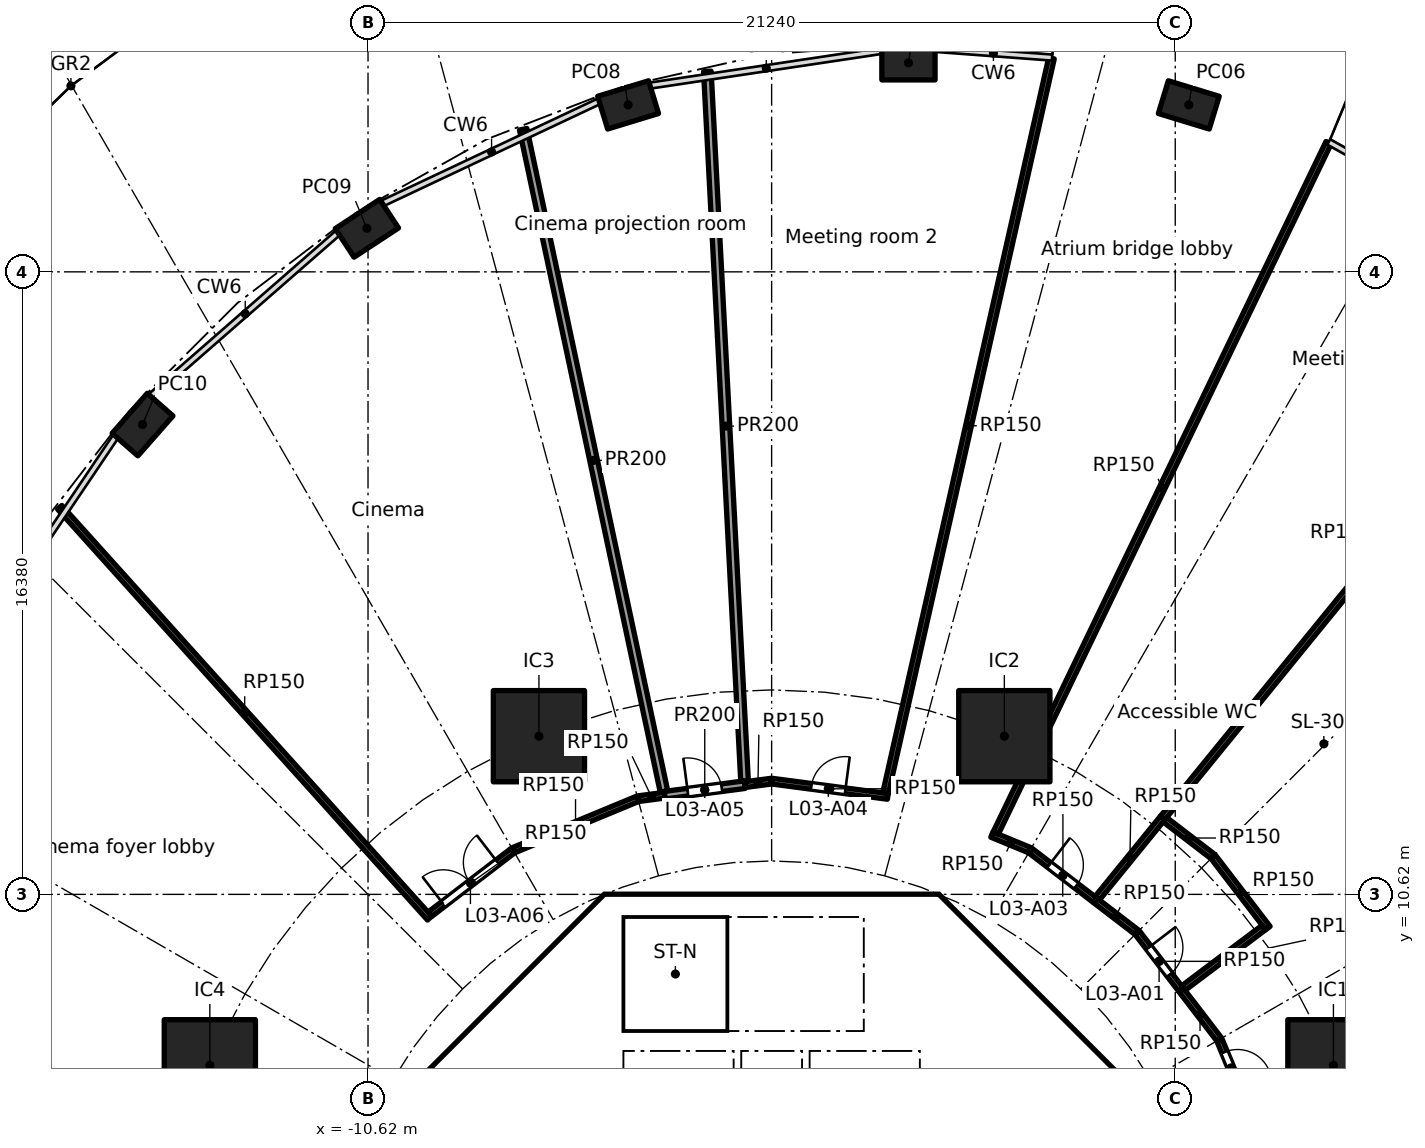
"""IFC4 building model, lengths in metres.
Left out: names, types, materials, properties, quantities, classifications, styles, units other than length and angle.
Written with IfcOpenShell. Run it as: python <this file> out.ifc"""

import sys

from ifc_helpers import new_model, si_unit, direction, frame, frame_2d, origin, origin_2d, place, context, subcontext, project, spatial, polyline, rectangle, hollow_rectangle, outline, extrude, element, fill, save


model = new_model("IFC4")
c1 = context("Model", 3, precision=1e-05, world=origin(), true_north=direction((0.0, 1.0)))
c2 = subcontext(c1, "Body", "Model", "MODEL_VIEW")
j1 = project(units=[si_unit("LENGTHUNIT", "METRE"), si_unit("PLANEANGLEUNIT", "RADIAN")], contexts=[c1])
p1 = place(None, origin())
s1 = spatial("IfcSite", under=j1, at=p1, CompositionType="ELEMENT")
p2 = place(p1, origin())
s2 = spatial("IfcBuilding", under=s1, at=p2, CompositionType="ELEMENT")
p3 = place(p2, frame((0.0, 0.0, 17.0)))
s3 = spatial("IfcBuildingStorey", under=s2, at=p3, CompositionType="ELEMENT", Elevation=17.0)
for number, where, z_axis, x_axis in (
    (1, (10.976, 31.393, 0.0), (0.0, 0.0, 1.0), (-0.957, 0.292, 0.0)),
    (2, (3.6, 32.5, 0.0), (0.0, 0.0, 1.0), (-1.0, 0.0, 0.0)),
    (3, (-3.776, 31.393, 0.0), (0.0, 0.0, 1.0), (-0.957, -0.292, 0.0)),
    (4, (-10.65, 28.146, 0.0), (0.0, 0.0, 1.0), (-0.836, -0.549, 0.0)),
    (5, (-16.552, 22.981, 0.0), (0.0, 0.0, 1.0), (-0.66, -0.751, 0.0)),
):
    element("IfcColumn", number, at=place(p3, frame(where, z_axis=z_axis, x_axis=x_axis)), inside=s3, PredefinedType="COLUMN", context=c2, shape_type="SweptSolid", body=[
        extrude(hollow_rectangle(XDim=1.4, YDim=0.9, WallThickness=0.05, at=origin_2d()), origin(), (0.0, 0.0, 1.0), 5.0),
    ])
for number, where, z_axis, x_axis in (
    (6, (14.782, 6.123, 0.0), (0.0, 0.0, 1.0), (1.0, 0.0, 0.0)),
    (7, (6.123, 14.782, 0.0), (0.0, 0.0, 1.0), (1.0, 0.0, 0.0)),
    (8, (-6.123, 14.782, 0.0), (0.0, 0.0, 1.0), (1.0, 0.0, 0.0)),
    (9, (-14.782, 6.123, 0.0), (0.0, 0.0, 1.0), (1.0, 0.0, 0.0)),
):
    element("IfcColumn", number, at=place(p3, frame(where, z_axis=z_axis, x_axis=x_axis)), inside=s3, PredefinedType="COLUMN", context=c2, shape_type="SweptSolid", body=[
        extrude(rectangle(XDim=2.4, YDim=2.4, at=origin_2d()), origin(), (0.0, 0.0, 1.0), 5.0),
    ])
p4 = place(p3, frame((9.988, 4.613, 0.0), z_axis=(0.0, 0.0, 1.0), x_axis=(-0.707106781187, 0.707106781187, 0.0)))
e10 = element("IfcWall", 10, at=p4, inside=s3, PredefinedType="SHEAR", context=c2, shape_type="SweptSolid", body=[
    extrude(rectangle(XDim=7.602, YDim=0.6, at=frame_2d((3.801, 0.0))), origin(), (0.0, 0.0, 1.0), 4.7),
])
p5 = place(p4, frame((3.201, 0.0, 0.0)))
e11 = element("IfcOpeningElement", 11, at=p5, cuts=e10, PredefinedType="OPENING", context=c2, shape_type="SweptSolid", body=[
    extrude(rectangle(XDim=1.2, YDim=2.1, at=frame_2d((0.6, 1.05))), frame((0.0, 0.31, 0.0), z_axis=(0.0, -1.0, 0.0), x_axis=(1.0, 0.0, 0.0)), (0.0, 0.0, 1.0), 0.62),
])
p6 = place(p3, frame((-4.613, 9.988, 0.0), z_axis=(0.0, 0.0, 1.0), x_axis=(-0.707106781187, -0.707106781187, 0.0)))
e12 = element("IfcWall", 12, at=p6, inside=s3, PredefinedType="SHEAR", context=c2, shape_type="SweptSolid", body=[
    extrude(rectangle(XDim=7.602, YDim=0.6, at=frame_2d((3.801, 0.0))), origin(), (0.0, 0.0, 1.0), 4.7),
])
p7 = place(p6, frame((0.351, 0.0, 0.0)))
e13 = element("IfcOpeningElement", 13, at=p7, cuts=e12, PredefinedType="OPENING", context=c2, shape_type="SweptSolid", body=[
    extrude(rectangle(XDim=1.1, YDim=2.1, at=frame_2d((0.55, 1.05))), frame((0.0, 0.31, 0.0), z_axis=(0.0, -1.0, 0.0), x_axis=(1.0, 0.0, 0.0)), (0.0, 0.0, 1.0), 0.62),
])
p8 = place(p3, frame((-5.8, 4.3, 0.0), z_axis=(0.0, 0.0, 1.0), x_axis=(0.0, 1.0, 0.0)))
e14 = element("IfcWall", 14, at=p8, inside=s3, PredefinedType="PARTITIONING", context=c2, shape_type="SweptSolid", body=[
    extrude(rectangle(XDim=3.927, YDim=0.15, at=frame_2d((1.963, 0.0))), origin(), (0.0, 0.0, 1.0), 4.7),
])
p9 = place(p8, frame((1.551, 0.0, 0.0)))
e15 = element("IfcOpeningElement", 15, at=p9, cuts=e14, PredefinedType="OPENING", context=c2, shape_type="SweptSolid", body=[
    extrude(rectangle(XDim=0.9, YDim=2.1, at=frame_2d((0.45, 1.05))), frame((0.0, 0.085, 0.0), z_axis=(0.0, -1.0, 0.0), x_axis=(1.0, 0.0, 0.0)), (0.0, 0.0, 1.0), 0.17),
])
p10 = place(p3, frame((4.0, 4.3, 0.0), z_axis=(0.0, 0.0, 1.0), x_axis=(0.0, 1.0, 0.0)))
e16 = element("IfcWall", 16, at=p10, inside=s3, PredefinedType="SOLIDWALL", context=c2, shape_type="SweptSolid", body=[
    extrude(rectangle(XDim=2.2, YDim=0.2, at=frame_2d((1.1, 0.0))), origin(), (0.0, 0.0, 1.0), 4.7),
])
p11 = place(p10, frame((0.55, 0.0, 0.0)))
e17 = element("IfcOpeningElement", 17, at=p11, cuts=e16, PredefinedType="OPENING", context=c2, shape_type="SweptSolid", body=[
    extrude(rectangle(XDim=1.1, YDim=2.1, at=frame_2d((0.55, 1.05))), frame((0.0, 0.11, 0.0), z_axis=(0.0, -1.0, 0.0), x_axis=(1.0, 0.0, 0.0)), (0.0, 0.0, 1.0), 0.22),
])
p12 = place(p3, frame((-4.0, 4.3, 0.0), z_axis=(0.0, 0.0, 1.0), x_axis=(0.0, 1.0, 0.0)))
e18 = element("IfcWall", 18, at=p12, inside=s3, PredefinedType="SOLIDWALL", context=c2, shape_type="SweptSolid", body=[
    extrude(rectangle(XDim=2.2, YDim=0.2, at=frame_2d((1.1, 0.0))), origin(), (0.0, 0.0, 1.0), 4.7),
])
p13 = place(p12, frame((0.55, 0.0, 0.0)))
e19 = element("IfcOpeningElement", 19, at=p13, cuts=e18, PredefinedType="OPENING", context=c2, shape_type="SweptSolid", body=[
    extrude(rectangle(XDim=1.1, YDim=2.1, at=frame_2d((0.55, 1.05))), frame((0.0, 0.11, 0.0), z_axis=(0.0, -1.0, 0.0), x_axis=(1.0, 0.0, 0.0)), (0.0, 0.0, 1.0), 0.22),
])
p14 = place(p3, frame((4.0, 7.025, 0.0), z_axis=(0.0, 0.0, 1.0), x_axis=(0.0, 1.0, 0.0)))
e20 = element("IfcWall", 20, at=p14, inside=s3, PredefinedType="SOLIDWALL", context=c2, shape_type="SweptSolid", body=[
    extrude(rectangle(XDim=3.0, YDim=0.2, at=frame_2d((1.5, 0.0))), origin(), (0.0, 0.0, 1.0), 4.7),
])
p15 = place(p14, frame((0.925, 0.0, 0.0)))
e21 = element("IfcOpeningElement", 21, at=p15, cuts=e20, PredefinedType="OPENING", context=c2, shape_type="SweptSolid", body=[
    extrude(rectangle(XDim=1.1, YDim=2.1, at=frame_2d((0.55, 1.05))), frame((0.0, 0.11, 0.0), z_axis=(0.0, -1.0, 0.0), x_axis=(1.0, 0.0, 0.0)), (0.0, 0.0, 1.0), 0.22),
])
p16 = place(p3, origin())
e22 = element("IfcWall", 22, at=p16, inside=s3, PredefinedType="SHEAR", context=c2, shape_type="SweptSolid", body=[
    extrude(outline(polyline([(-4.152, 10.025), (-4.401, 9.776), (-4.825, 10.2), (-4.401, 10.625), (4.401, 10.625), (4.825, 10.2), (4.401, 9.776), (4.152, 10.025), (-4.152, 10.025)])), origin(), (0.0, 0.0, 1.0), 4.7),
])
for number, where, z_axis, x_axis in (
    (23, (-0.9, 4.3, 0.0), (0.0, 0.0, 1.0), (0.0, 1.0, 0.0)),
    (24, (0.9, 4.3, 0.0), (0.0, 0.0, 1.0), (0.0, 1.0, 0.0)),
):
    element("IfcWall", number, at=place(p3, frame(where, z_axis=z_axis, x_axis=x_axis)), inside=s3, PredefinedType="SOLIDWALL", context=c2, shape_type="SweptSolid", body=[
        extrude(rectangle(XDim=2.2, YDim=0.2, at=frame_2d((1.1, 0.0))), origin(), (0.0, 0.0, 1.0), 4.7),
    ])
p17 = place(p3, origin())
e25 = element("IfcWall", 25, at=p17, inside=s3, PredefinedType="SOLIDWALL", context=c2, shape_type="SweptSolid", body=[
    extrude(outline(polyline([(-3.9, 7.025), (-4.1, 7.025), (-4.1, 10.025), (-3.9, 10.025), (-3.9, 7.025)])), origin(), (0.0, 0.0, 1.0), 4.7),
])
p18 = place(p3, origin())
e26 = element("IfcWall", 26, at=p18, inside=s3, PredefinedType="SOLIDWALL", context=c2, shape_type="SweptSolid", body=[
    extrude(outline(polyline([(4.1, 6.5), (-4.1, 6.5), (-4.1, 7.025), (4.1, 7.025), (4.1, 6.5)])), origin(), (0.0, 0.0, 1.0), 4.7),
])
p19 = place(p3, frame((-18.731, 20.803, 0.0), z_axis=(0.0, 0.0, 1.0), x_axis=(0.669128883479, -0.743146376762, 0.0)))
e27 = element("IfcWall", 27, at=p19, inside=s3, PredefinedType="PARTITIONING", context=c2, shape_type="SweptSolid", body=[
    extrude(rectangle(XDim=14.543, YDim=0.15, at=frame_2d((7.271, 0.0))), origin(), (0.0, 0.0, 1.0), 4.7),
])
p20 = place(p3, frame((-8.991, 10.097, 0.0), z_axis=(0.0, 0.0, 1.0), x_axis=(0.793399081384, 0.608701813418, 0.0)))
e28 = element("IfcWall", 28, at=p20, inside=s3, PredefinedType="PARTITIONING", context=c2, shape_type="SweptSolid", body=[
    extrude(rectangle(XDim=2.75, YDim=0.15, at=frame_2d((1.375, 0.0))), origin(), (0.0, 0.0, 1.0), 4.7),
])
p21 = place(p20, frame((0.443, 0.0, 0.0)))
e29 = element("IfcOpeningElement", 29, at=p21, cuts=e28, PredefinedType="OPENING", context=c2, shape_type="SweptSolid", body=[
    extrude(rectangle(XDim=1.8, YDim=2.1, at=frame_2d((0.9, 1.05))), frame((0.0, 0.085, 0.0), z_axis=(0.0, -1.0, 0.0), x_axis=(1.0, 0.0, 0.0)), (0.0, 0.0, 1.0), 0.17),
])
p22 = place(p3, frame((-6.789, 11.782, 0.0), z_axis=(0.0, 0.0, 1.0), x_axis=(0.923881838111, 0.382677866108, 0.0)))
e30 = element("IfcWall", 30, at=p22, inside=s3, PredefinedType="PARTITIONING", context=c2, shape_type="SweptSolid", body=[
    extrude(rectangle(XDim=3.527, YDim=0.15, at=frame_2d((1.763, 0.0))), origin(), (0.0, 0.0, 1.0), 4.7),
])
p23 = place(p3, frame((-3.508, 13.138, 0.0), z_axis=(0.0, 0.0, 1.0), x_axis=(0.991460212813, 0.130409533429, 0.0)))
e31 = element("IfcWall", 31, at=p23, inside=s3, PredefinedType="PARTITIONING", context=c2, shape_type="SweptSolid", body=[
    extrude(rectangle(XDim=0.702, YDim=0.15, at=frame_2d((0.351, 0.0))), origin(), (0.0, 0.0, 1.0), 4.7),
])
p24 = place(p3, frame((-0.708, 13.507, 0.0), z_axis=(0.0, 0.0, 1.0), x_axis=(0.991466123966, 0.130364585024, 0.0)))
e32 = element("IfcWall", 32, at=p24, inside=s3, PredefinedType="PARTITIONING", context=c2, shape_type="SweptSolid", body=[
    extrude(rectangle(XDim=0.702, YDim=0.15, at=frame_2d((0.351, 0.0))), origin(), (0.0, 0.0, 1.0), 4.7),
])
p25 = place(p3, frame((0.012, 13.598, 0.0), z_axis=(0.0, 0.0, 1.0), x_axis=(0.991450776896, -0.130481251495, 0.0)))
e33 = element("IfcWall", 33, at=p25, inside=s3, PredefinedType="PARTITIONING", context=c2, shape_type="SweptSolid", body=[
    extrude(rectangle(XDim=3.071, YDim=0.15, at=frame_2d((1.535, 0.0))), origin(), (0.0, 0.0, 1.0), 4.7),
])
p26 = place(p25, frame((1.042, 0.0, 0.0)))
e34 = element("IfcOpeningElement", 34, at=p26, cuts=e33, PredefinedType="OPENING", context=c2, shape_type="SweptSolid", body=[
    extrude(rectangle(XDim=0.9, YDim=2.1, at=frame_2d((0.45, 1.05))), frame((0.0, 0.085, 0.0), z_axis=(0.0, -1.0, 0.0), x_axis=(1.0, 0.0, 0.0)), (0.0, 0.0, 1.0), 0.17),
])
p27 = place(p3, frame((2.998, 13.281, 0.0), z_axis=(0.0, 0.0, 1.0), x_axis=(0.220191699756, 0.975456618901, 0.0)))
e35 = element("IfcWall", 35, at=p27, inside=s3, PredefinedType="PARTITIONING", context=c2, shape_type="SweptSolid", body=[
    extrude(rectangle(XDim=19.825, YDim=0.15, at=frame_2d((9.912, 0.0))), origin(), (0.0, 0.0, 1.0), 4.7),
])
p28 = place(p3, frame((5.795, 12.194, 0.0), z_axis=(0.0, 0.0, 1.0), x_axis=(0.923867429555, -0.382712650179, 0.0)))
e36 = element("IfcWall", 36, at=p28, inside=s3, PredefinedType="PARTITIONING", context=c2, shape_type="SweptSolid", body=[
    extrude(rectangle(XDim=1.075, YDim=0.15, at=frame_2d((0.538, 0.0))), origin(), (0.0, 0.0, 1.0), 4.7),
])
p29 = place(p3, frame((6.809, 11.771, 0.0), z_axis=(0.0, 0.0, 1.0), x_axis=(0.793372937326, -0.608735888805, 0.0)))
e37 = element("IfcWall", 37, at=p29, inside=s3, PredefinedType="PARTITIONING", context=c2, shape_type="SweptSolid", body=[
    extrude(rectangle(XDim=2.155, YDim=0.15, at=frame_2d((1.078, 0.0))), origin(), (0.0, 0.0, 1.0), 4.7),
])
p30 = place(p29, frame((0.622, 0.0, 0.0)))
e38 = element("IfcOpeningElement", 38, at=p30, cuts=e37, PredefinedType="OPENING", context=c2, shape_type="SweptSolid", body=[
    extrude(rectangle(XDim=0.9, YDim=2.1, at=frame_2d((0.45, 1.05))), frame((0.0, 0.085, 0.0), z_axis=(0.0, -1.0, 0.0), x_axis=(1.0, 0.0, 0.0)), (0.0, 0.0, 1.0), 0.17),
])
p31 = place(p3, frame((8.519, 10.459, 0.0), z_axis=(0.0, 0.0, 1.0), x_axis=(0.793371316762, -0.6087380009, 0.0)))
e39 = element("IfcWall", 39, at=p31, inside=s3, PredefinedType="PARTITIONING", context=c2, shape_type="SweptSolid", body=[
    extrude(rectangle(XDim=1.371, YDim=0.15, at=frame_2d((0.686, 0.0))), origin(), (0.0, 0.0, 1.0), 4.7),
])
p32 = place(p3, frame((8.567, 10.517, 0.0), z_axis=(0.0, 0.0, 1.0), x_axis=(0.631573271363, 0.775316195432, 0.0)))
e40 = element("IfcWall", 40, at=p32, inside=s3, PredefinedType="PARTITIONING", context=c2, shape_type="SweptSolid", body=[
    extrude(rectangle(XDim=2.726, YDim=0.15, at=frame_2d((1.363, 0.0))), origin(), (0.0, 0.0, 1.0), 4.7),
])
p33 = place(p3, frame((9.624, 9.607, 0.0), z_axis=(0.0, 0.0, 1.0), x_axis=(0.608754453805, -0.793358692504, 0.0)))
e41 = element("IfcWall", 41, at=p33, inside=s3, PredefinedType="PARTITIONING", context=c2, shape_type="SweptSolid", body=[
    extrude(rectangle(XDim=1.888, YDim=0.15, at=frame_2d((0.944, 0.0))), origin(), (0.0, 0.0, 1.0), 4.7),
])
p34 = place(p33, frame((0.488, 0.0, 0.0)))
e42 = element("IfcOpeningElement", 42, at=p34, cuts=e41, PredefinedType="OPENING", context=c2, shape_type="SweptSolid", body=[
    extrude(rectangle(XDim=0.9, YDim=2.1, at=frame_2d((0.45, 1.05))), frame((0.0, 0.085, 0.0), z_axis=(0.0, -1.0, 0.0), x_axis=(1.0, 0.0, 0.0)), (0.0, 0.0, 1.0), 0.17),
])
p35 = place(p3, frame((10.348, 12.585, 0.0), z_axis=(0.0, 0.0, 1.0), x_axis=(0.793328373205, -0.608793965368, 0.0)))
e43 = element("IfcWall", 43, at=p35, inside=s3, PredefinedType="PARTITIONING", context=c2, shape_type="SweptSolid", body=[
    extrude(rectangle(XDim=1.584, YDim=0.15, at=frame_2d((0.792, 0.0))), origin(), (0.0, 0.0, 1.0), 4.7),
])
p36 = place(p3, frame((10.288, 12.631, 0.0), z_axis=(0.0, 0.0, 1.0), x_axis=(0.631546535922, 0.77533797338, 0.0)))
e44 = element("IfcWall", 44, at=p36, inside=s3, PredefinedType="PARTITIONING", context=c2, shape_type="SweptSolid", body=[
    extrude(rectangle(XDim=17.325, YDim=0.15, at=frame_2d((8.663, 0.0))), origin(), (0.0, 0.0, 1.0), 4.7),
])
p37 = place(p3, frame((10.774, 8.109, 0.0), z_axis=(0.0, 0.0, 1.0), x_axis=(0.608716251771, -0.793388003961, 0.0)))
e45 = element("IfcWall", 45, at=p37, inside=s3, PredefinedType="PARTITIONING", context=c2, shape_type="SweptSolid", body=[
    extrude(rectangle(XDim=1.638, YDim=0.15, at=frame_2d((0.819, 0.0))), origin(), (0.0, 0.0, 1.0), 4.7),
])
p38 = place(p3, frame((11.621, 11.604, 0.0), z_axis=(0.0, 0.0, 1.0), x_axis=(0.608759688573, -0.793354675771, 0.0)))
e46 = element("IfcWall", 46, at=p38, inside=s3, PredefinedType="PARTITIONING", context=c2, shape_type="SweptSolid", body=[
    extrude(rectangle(XDim=2.358, YDim=0.15, at=frame_2d((1.179, 0.0))), origin(), (0.0, 0.0, 1.0), 4.7),
])
p39 = place(p3, frame((11.782, 6.789, 0.0), z_axis=(0.0, 0.0, 1.0), x_axis=(0.382677866108, -0.923881838111, 0.0)))
e47 = element("IfcWall", 47, at=p39, inside=s3, PredefinedType="PARTITIONING", context=c2, shape_type="SweptSolid", body=[
    extrude(rectangle(XDim=3.527, YDim=0.15, at=frame_2d((1.763, 0.0))), origin(), (0.0, 0.0, 1.0), 4.7),
])
p40 = place(p39, frame((0.346, 0.0, 0.0)))
e48 = element("IfcOpeningElement", 48, at=p40, cuts=e47, PredefinedType="OPENING", context=c2, shape_type="SweptSolid", body=[
    extrude(rectangle(XDim=0.9, YDim=2.1, at=frame_2d((0.45, 1.05))), frame((0.0, 0.085, 0.0), z_axis=(0.0, -1.0, 0.0), x_axis=(1.0, 0.0, 0.0)), (0.0, 0.0, 1.0), 0.17),
])
p41 = place(p3, frame((12.951, 9.748, 0.0), z_axis=(0.0, 0.0, 1.0), x_axis=(-0.798970748419, -0.601369888813, 0.0)))
e49 = element("IfcWall", 49, at=p41, inside=s3, PredefinedType="PARTITIONING", context=c2, shape_type="SweptSolid", body=[
    extrude(rectangle(XDim=2.65, YDim=0.15, at=frame_2d((1.325, 0.0))), origin(), (0.0, 0.0, 1.0), 4.7),
])
p42 = place(p3, frame((14.654, 30.398, 0.0), z_axis=(0.0, 0.0, 1.0), x_axis=(-0.434261119912, -0.900787033506, 0.0)))
e50 = element("IfcWall", 50, at=p42, inside=s3, PredefinedType="PARTITIONING", context=c2, shape_type="SweptSolid", body=[
    extrude(rectangle(XDim=20.166, YDim=0.15, at=frame_2d((10.083, 0.0))), origin(), (0.0, 0.0, 1.0), 4.7),
])
p43 = place(p3, frame((-6.537, 30.752, 0.0), z_axis=(0.0, 0.0, 1.0), x_axis=(0.207909569071, -0.978148051722, 0.0)))
e51 = element("IfcWall", 51, at=p43, inside=s3, PredefinedType="PARTITIONING", context=c2, shape_type="SweptSolid", body=[
    extrude(rectangle(XDim=17.813, YDim=0.2, at=frame_2d((8.907, 0.0))), origin(), (0.0, 0.0, 1.0), 4.7),
])
p44 = place(p3, frame((-2.812, 13.23, 0.0), z_axis=(0.0, 0.0, 1.0), x_axis=(0.991438625664, 0.130573548402, 0.0)))
e52 = element("IfcWall", 52, at=p44, inside=s3, PredefinedType="PARTITIONING", context=c2, shape_type="SweptSolid", body=[
    extrude(rectangle(XDim=2.122, YDim=0.2, at=frame_2d((1.061, 0.0))), origin(), (0.0, 0.0, 1.0), 4.7),
])
p45 = place(p44, frame((0.611, 0.0, 0.0)))
e53 = element("IfcOpeningElement", 53, at=p45, cuts=e52, PredefinedType="OPENING", context=c2, shape_type="SweptSolid", body=[
    extrude(rectangle(XDim=0.9, YDim=2.1, at=frame_2d((0.45, 1.05))), frame((0.0, 0.11, 0.0), z_axis=(0.0, -1.0, 0.0), x_axis=(1.0, 0.0, 0.0)), (0.0, 0.0, 1.0), 0.22),
])
p46 = place(p3, frame((-0.713, 13.607, 0.0), z_axis=(0.0, 0.0, 1.0), x_axis=(-0.05233398673, 0.99862963797, 0.0)))
e54 = element("IfcWall", 54, at=p46, inside=s3, PredefinedType="PARTITIONING", context=c2, shape_type="SweptSolid", body=[
    extrude(rectangle(XDim=18.693, YDim=0.2, at=frame_2d((9.346, 0.0))), origin(), (0.0, 0.0, 1.0), 4.7),
])
p47 = place(p15, origin())
e55 = element("IfcDoor", 55, at=p47, inside=s3, OperationType="SINGLE_SWING_LEFT", PredefinedType="DOOR", context=c2, shape_type="SweptSolid", body=[
    extrude(rectangle(XDim=1.1, YDim=2.1, at=frame_2d((0.55, 1.05))), frame((0.0, 0.025, 0.0), z_axis=(0.0, -1.0, 0.0), x_axis=(1.0, 0.0, 0.0)), (0.0, 0.0, 1.0), 0.05),
])
fill(e21, e55)
p48 = place(p9, origin())
e56 = element("IfcDoor", 56, at=p48, inside=s3, OperationType="SINGLE_SWING_RIGHT", PredefinedType="DOOR", context=c2, shape_type="SweptSolid", body=[
    extrude(rectangle(XDim=0.9, YDim=2.1, at=frame_2d((0.45, 1.05))), frame((0.0, 0.025, 0.0), z_axis=(0.0, -1.0, 0.0), x_axis=(1.0, 0.0, 0.0)), (0.0, 0.0, 1.0), 0.05),
])
fill(e15, e56)
p49 = place(p5, origin())
e57 = element("IfcDoor", 57, at=p49, inside=s3, OperationType="SINGLE_SWING_RIGHT", PredefinedType="DOOR", context=c2, shape_type="SweptSolid", body=[
    extrude(rectangle(XDim=1.2, YDim=2.1, at=frame_2d((0.6, 1.05))), frame((0.0, 0.025, 0.0), z_axis=(0.0, -1.0, 0.0), x_axis=(1.0, 0.0, 0.0)), (0.0, 0.0, 1.0), 0.05),
])
fill(e11, e57)
p50 = place(p7, origin())
e58 = element("IfcDoor", 58, at=p50, inside=s3, OperationType="SINGLE_SWING_RIGHT", PredefinedType="DOOR", context=c2, shape_type="SweptSolid", body=[
    extrude(rectangle(XDim=1.1, YDim=2.1, at=frame_2d((0.55, 1.05))), frame((0.0, 0.025, 0.0), z_axis=(0.0, -1.0, 0.0), x_axis=(1.0, 0.0, 0.0)), (0.0, 0.0, 1.0), 0.05),
])
fill(e13, e58)
p51 = place(p34, origin())
e59 = element("IfcDoor", 59, at=p51, inside=s3, OperationType="SINGLE_SWING_LEFT", PredefinedType="DOOR", context=c2, shape_type="SweptSolid", body=[
    extrude(rectangle(XDim=0.9, YDim=2.1, at=frame_2d((0.45, 1.05))), frame((0.0, 0.025, 0.0), z_axis=(0.0, -1.0, 0.0), x_axis=(1.0, 0.0, 0.0)), (0.0, 0.0, 1.0), 0.05),
])
fill(e42, e59)
p52 = place(p40, origin())
e60 = element("IfcDoor", 60, at=p52, inside=s3, OperationType="SINGLE_SWING_RIGHT", PredefinedType="DOOR", context=c2, shape_type="SweptSolid", body=[
    extrude(rectangle(XDim=0.9, YDim=2.1, at=frame_2d((0.45, 1.05))), frame((0.0, 0.025, 0.0), z_axis=(0.0, -1.0, 0.0), x_axis=(1.0, 0.0, 0.0)), (0.0, 0.0, 1.0), 0.05),
])
fill(e48, e60)
p53 = place(p30, origin())
e61 = element("IfcDoor", 61, at=p53, inside=s3, OperationType="SINGLE_SWING_LEFT", PredefinedType="DOOR", context=c2, shape_type="SweptSolid", body=[
    extrude(rectangle(XDim=0.9, YDim=2.1, at=frame_2d((0.45, 1.05))), frame((0.0, 0.025, 0.0), z_axis=(0.0, -1.0, 0.0), x_axis=(1.0, 0.0, 0.0)), (0.0, 0.0, 1.0), 0.05),
])
fill(e38, e61)
p54 = place(p26, origin())
e62 = element("IfcDoor", 62, at=p54, inside=s3, OperationType="SINGLE_SWING_RIGHT", PredefinedType="DOOR", context=c2, shape_type="SweptSolid", body=[
    extrude(rectangle(XDim=0.9, YDim=2.1, at=frame_2d((0.45, 1.05))), frame((0.0, 0.025, 0.0), z_axis=(0.0, -1.0, 0.0), x_axis=(1.0, 0.0, 0.0)), (0.0, 0.0, 1.0), 0.05),
])
fill(e34, e62)
p55 = place(p45, origin())
e63 = element("IfcDoor", 63, at=p55, inside=s3, OperationType="SINGLE_SWING_LEFT", PredefinedType="DOOR", context=c2, shape_type="SweptSolid", body=[
    extrude(rectangle(XDim=0.9, YDim=2.1, at=frame_2d((0.45, 1.05))), frame((0.0, 0.025, 0.0), z_axis=(0.0, -1.0, 0.0), x_axis=(1.0, 0.0, 0.0)), (0.0, 0.0, 1.0), 0.05),
])
fill(e53, e63)
p56 = place(p21, origin())
e64 = element("IfcDoor", 64, at=p56, inside=s3, OperationType="DOUBLE_DOOR_SINGLE_SWING", PredefinedType="DOOR", context=c2, shape_type="SweptSolid", body=[
    extrude(rectangle(XDim=1.8, YDim=2.1, at=frame_2d((0.9, 1.05))), frame((0.0, 0.025, 0.0), z_axis=(0.0, -1.0, 0.0), x_axis=(1.0, 0.0, 0.0)), (0.0, 0.0, 1.0), 0.05),
])
fill(e29, e64)
save(model, sys.argv[1])
